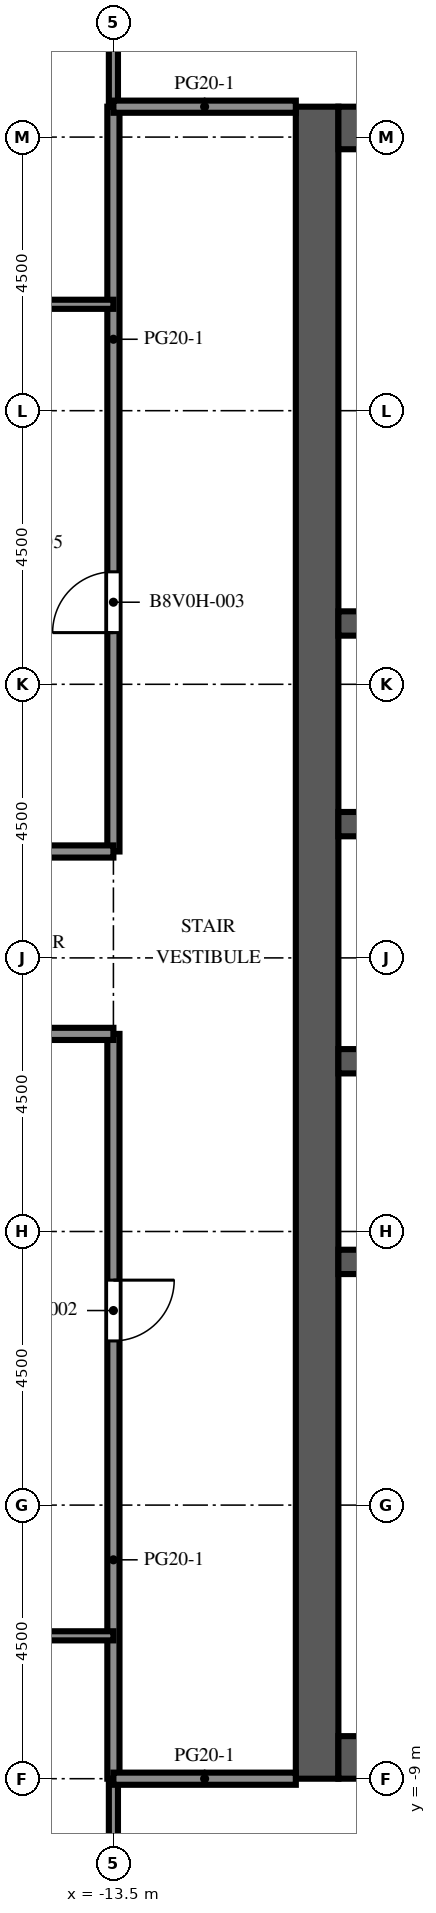
"""IFC4 building model, lengths in metres.
Left out: names, types, materials, properties, quantities, classifications, styles, units other than length and angle.
Written with IfcOpenShell. Run it as: python <this file> out.ifc"""

import sys

from ifc_helpers import new_model, si_unit, direction, frame, frame_2d, origin, place, context, subcontext, project, spatial, rectangle, extrude, element, fill, save


model = new_model("IFC4")
c1 = context("Model", 3, precision=1e-05, world=origin(), true_north=direction((0.0, 1.0)))
c2 = subcontext(c1, "Body", "Model", "MODEL_VIEW")
j1 = project(units=[si_unit("LENGTHUNIT", "METRE"), si_unit("PLANEANGLEUNIT", "RADIAN")], contexts=[c1])
p1 = place(None, origin())
s1 = spatial("IfcSite", under=j1, at=p1, CompositionType="ELEMENT")
p2 = place(p1, origin())
s2 = spatial("IfcBuilding", under=s1, at=p2, CompositionType="ELEMENT")
p3 = place(p2, frame((0.0, 0.0, 266.3)))
s3 = spatial("IfcBuildingStorey", under=s2, at=p3, CompositionType="ELEMENT", Elevation=266.3)
p4 = place(p3, frame((-10.15, -9.0, 0.0), z_axis=(0.0, 0.0, 1.0), x_axis=(0.0, 1.0, 0.0)))
e1 = element("IfcWall", 1, at=p4, inside=s3, PredefinedType="SHEAR", context=c2, shape_type="SweptSolid", body=[
    extrude(rectangle(XDim=27.5, YDim=0.7, at=frame_2d((13.75, 0.0))), origin(), (0.0, 0.0, 1.0), 4.1),
])
p5 = place(p4, frame((12.55, 0.0, 0.0)))
e2 = element("IfcOpeningElement", 2, at=p5, cuts=e1, PredefinedType="OPENING", context=c2, shape_type="SweptSolid", body=[
    extrude(rectangle(XDim=2.4, YDim=2.4, at=frame_2d((1.2, 1.2))), frame((0.0, 0.36, 0.0), z_axis=(0.0, -1.0, 0.0), x_axis=(1.0, 0.0, 0.0)), (0.0, 0.0, 1.0), 0.72),
])
p6 = place(p4, frame((6.825, 0.0, 0.0)))
e3 = element("IfcOpeningElement", 3, at=p6, cuts=e1, PredefinedType="OPENING", context=c2, shape_type="SweptSolid", body=[
    extrude(rectangle(XDim=1.2, YDim=2.1, at=frame_2d((0.6, 1.05))), frame((0.0, 0.36, 0.0), z_axis=(0.0, -1.0, 0.0), x_axis=(1.0, 0.0, 0.0)), (0.0, 0.0, 1.0), 0.72),
])
p7 = place(p4, frame((19.475, 0.0, 0.0)))
e4 = element("IfcOpeningElement", 4, at=p7, cuts=e1, PredefinedType="OPENING", context=c2, shape_type="SweptSolid", body=[
    extrude(rectangle(XDim=1.2, YDim=2.1, at=frame_2d((0.6, 1.05))), frame((0.0, 0.36, 0.0), z_axis=(0.0, -1.0, 0.0), x_axis=(1.0, 0.0, 0.0)), (0.0, 0.0, 1.0), 0.72),
])
for number, where, z_axis, x_axis in (
    (5, (-9.8, -8.65, 0.0), (0.0, 0.0, 1.0), (1.0, 0.0, 0.0)),
    (6, (-9.8, 18.15, 0.0), (0.0, 0.0, 1.0), (1.0, 0.0, 0.0)),
):
    element("IfcWall", number, at=place(p3, frame(where, z_axis=z_axis, x_axis=x_axis)), inside=s3, PredefinedType="SHEAR", context=c2, shape_type="SweptSolid", body=[
        extrude(rectangle(XDim=10.6, YDim=0.7, at=frame_2d((5.3, 0.0))), origin(), (0.0, 0.0, 1.0), 4.1),
    ])
p8 = place(p3, frame((-9.8, -0.5, 0.0), z_axis=(0.0, 0.0, 1.0), x_axis=(1.0, 0.0, 0.0)))
e7 = element("IfcWall", 7, at=p8, inside=s3, PredefinedType="SHEAR", context=c2, shape_type="SweptSolid", body=[
    extrude(rectangle(XDim=10.6, YDim=0.4, at=frame_2d((5.3, 0.0))), origin(), (0.0, 0.0, 1.0), 4.1),
])
p9 = place(p3, frame((-9.8, 2.8, 0.0), z_axis=(0.0, 0.0, 1.0), x_axis=(1.0, 0.0, 0.0)))
e8 = element("IfcWall", 8, at=p9, inside=s3, PredefinedType="SHEAR", context=c2, shape_type="SweptSolid", body=[
    extrude(rectangle(XDim=10.6, YDim=0.4, at=frame_2d((5.3, 0.0))), origin(), (0.0, 0.0, 1.0), 4.1),
])
p10 = place(p9, frame((0.688, 0.0, 0.0)))
e9 = element("IfcOpeningElement", 9, at=p10, cuts=e8, PredefinedType="OPENING", context=c2, shape_type="SweptSolid", body=[
    extrude(rectangle(XDim=1.1, YDim=2.1, at=frame_2d((0.55, 1.05))), frame((0.0, 0.21, 0.0), z_axis=(0.0, -1.0, 0.0), x_axis=(1.0, 0.0, 0.0)), (0.0, 0.0, 1.0), 0.42),
])
p11 = place(p9, frame((3.438, 0.0, 0.0)))
e10 = element("IfcOpeningElement", 10, at=p11, cuts=e8, PredefinedType="OPENING", context=c2, shape_type="SweptSolid", body=[
    extrude(rectangle(XDim=1.1, YDim=2.1, at=frame_2d((0.55, 1.05))), frame((0.0, 0.21, 0.0), z_axis=(0.0, -1.0, 0.0), x_axis=(1.0, 0.0, 0.0)), (0.0, 0.0, 1.0), 0.42),
])
p12 = place(p9, frame((6.113, 0.0, 0.0)))
e11 = element("IfcOpeningElement", 11, at=p12, cuts=e8, PredefinedType="OPENING", context=c2, shape_type="SweptSolid", body=[
    extrude(rectangle(XDim=1.0, YDim=2.1, at=frame_2d((0.5, 1.05))), frame((0.0, 0.21, 0.0), z_axis=(0.0, -1.0, 0.0), x_axis=(1.0, 0.0, 0.0)), (0.0, 0.0, 1.0), 0.42),
])
p13 = place(p9, frame((8.863, 0.0, 0.0)))
e12 = element("IfcOpeningElement", 12, at=p13, cuts=e8, PredefinedType="OPENING", context=c2, shape_type="SweptSolid", body=[
    extrude(rectangle(XDim=1.0, YDim=2.1, at=frame_2d((0.5, 1.05))), frame((0.0, 0.21, 0.0), z_axis=(0.0, -1.0, 0.0), x_axis=(1.0, 0.0, 0.0)), (0.0, 0.0, 1.0), 0.42),
])
p14 = place(p3, frame((-9.8, 6.7, 0.0), z_axis=(0.0, 0.0, 1.0), x_axis=(1.0, 0.0, 0.0)))
e13 = element("IfcWall", 13, at=p14, inside=s3, PredefinedType="SHEAR", context=c2, shape_type="SweptSolid", body=[
    extrude(rectangle(XDim=10.6, YDim=0.4, at=frame_2d((5.3, 0.0))), origin(), (0.0, 0.0, 1.0), 4.1),
])
p15 = place(p14, frame((3.438, 0.0, 0.0)))
e14 = element("IfcOpeningElement", 14, at=p15, cuts=e13, PredefinedType="OPENING", context=c2, shape_type="SweptSolid", body=[
    extrude(rectangle(XDim=1.1, YDim=2.1, at=frame_2d((0.55, 1.05))), frame((0.0, 0.21, 0.0), z_axis=(0.0, -1.0, 0.0), x_axis=(1.0, 0.0, 0.0)), (0.0, 0.0, 1.0), 0.42),
])
p16 = place(p14, frame((6.062, 0.0, 0.0)))
e15 = element("IfcOpeningElement", 15, at=p16, cuts=e13, PredefinedType="OPENING", context=c2, shape_type="SweptSolid", body=[
    extrude(rectangle(XDim=1.1, YDim=2.1, at=frame_2d((0.55, 1.05))), frame((0.0, 0.21, 0.0), z_axis=(0.0, -1.0, 0.0), x_axis=(1.0, 0.0, 0.0)), (0.0, 0.0, 1.0), 0.42),
])
p17 = place(p14, frame((8.812, 0.0, 0.0)))
e16 = element("IfcOpeningElement", 16, at=p17, cuts=e13, PredefinedType="OPENING", context=c2, shape_type="SweptSolid", body=[
    extrude(rectangle(XDim=1.1, YDim=2.1, at=frame_2d((0.55, 1.05))), frame((0.0, 0.21, 0.0), z_axis=(0.0, -1.0, 0.0), x_axis=(1.0, 0.0, 0.0)), (0.0, 0.0, 1.0), 0.42),
])
p18 = place(p14, frame((0.738, 0.0, 0.0)))
e17 = element("IfcOpeningElement", 17, at=p18, cuts=e13, PredefinedType="OPENING", context=c2, shape_type="SweptSolid", body=[
    extrude(rectangle(XDim=1.0, YDim=2.1, at=frame_2d((0.5, 1.05))), frame((0.0, 0.21, 0.0), z_axis=(0.0, -1.0, 0.0), x_axis=(1.0, 0.0, 0.0)), (0.0, 0.0, 1.0), 0.42),
])
p19 = place(p3, frame((-9.8, 10.0, 0.0), z_axis=(0.0, 0.0, 1.0), x_axis=(1.0, 0.0, 0.0)))
e18 = element("IfcWall", 18, at=p19, inside=s3, PredefinedType="SHEAR", context=c2, shape_type="SweptSolid", body=[
    extrude(rectangle(XDim=10.6, YDim=0.4, at=frame_2d((5.3, 0.0))), origin(), (0.0, 0.0, 1.0), 4.1),
])
p20 = place(p3, frame((-13.5, -9.0, 0.0), z_axis=(0.0, 0.0, 1.0), x_axis=(0.0, -1.0, 0.0)))
e19 = element("IfcWall", 19, at=p20, inside=s3, PredefinedType="PARTITIONING", context=c2, shape_type="SweptSolid", body=[
    extrude(rectangle(XDim=8.6, YDim=0.15, at=frame_2d((4.3, 0.0))), origin(), (0.0, 0.0, 1.0), 3.65),
])
p21 = place(p20, frame((5.4, 0.0, 0.0)))
e20 = element("IfcOpeningElement", 20, at=p21, cuts=e19, PredefinedType="OPENING", context=c2, shape_type="SweptSolid", body=[
    extrude(rectangle(XDim=1.0, YDim=2.1, at=frame_2d((0.5, 1.05))), frame((0.0, 0.085, 0.0), z_axis=(0.0, -1.0, 0.0), x_axis=(1.0, 0.0, 0.0)), (0.0, 0.0, 1.0), 0.17),
])
p22 = place(p3, frame((-13.5, 26.6, 0.0), z_axis=(0.0, 0.0, 1.0), x_axis=(0.0, -1.0, 0.0)))
e21 = element("IfcWall", 21, at=p22, inside=s3, PredefinedType="PARTITIONING", context=c2, shape_type="SweptSolid", body=[
    extrude(rectangle(XDim=8.1, YDim=0.15, at=frame_2d((4.05, 0.0))), origin(), (0.0, 0.0, 1.0), 3.65),
])
p23 = place(p22, frame((2.25, 0.0, 0.0)))
e22 = element("IfcOpeningElement", 22, at=p23, cuts=e21, PredefinedType="OPENING", context=c2, shape_type="SweptSolid", body=[
    extrude(rectangle(XDim=1.0, YDim=2.1, at=frame_2d((0.5, 1.05))), frame((0.0, 0.085, 0.0), z_axis=(0.0, -1.0, 0.0), x_axis=(1.0, 0.0, 0.0)), (0.0, 0.0, 1.0), 0.17),
])
p24 = place(p3, frame((-13.5, -9.0, 0.0), z_axis=(0.0, 0.0, 1.0), x_axis=(0.0, 1.0, 0.0)))
e23 = element("IfcWall", 23, at=p24, inside=s3, PredefinedType="PARTITIONING", context=c2, shape_type="SweptSolid", body=[
    extrude(rectangle(XDim=12.25, YDim=0.2, at=frame_2d((6.125, 0.0))), origin(), (0.0, 0.0, 1.0), 3.65),
])
p25 = place(p24, frame((7.2, 0.0, 0.0)))
e24 = element("IfcOpeningElement", 24, at=p25, cuts=e23, PredefinedType="OPENING", context=c2, shape_type="SweptSolid", body=[
    extrude(rectangle(XDim=1.0, YDim=2.1, at=frame_2d((0.5, 1.05))), frame((0.0, 0.11, 0.0), z_axis=(0.0, -1.0, 0.0), x_axis=(1.0, 0.0, 0.0)), (0.0, 0.0, 1.0), 0.22),
])
p26 = place(p3, frame((-13.5, 6.25, 0.0), z_axis=(0.0, 0.0, 1.0), x_axis=(0.0, 1.0, 0.0)))
e25 = element("IfcWall", 25, at=p26, inside=s3, PredefinedType="PARTITIONING", context=c2, shape_type="SweptSolid", body=[
    extrude(rectangle(XDim=12.25, YDim=0.2, at=frame_2d((6.125, 0.0))), origin(), (0.0, 0.0, 1.0), 3.65),
])
p27 = place(p26, frame((3.6, 0.0, 0.0)))
e26 = element("IfcOpeningElement", 26, at=p27, cuts=e25, PredefinedType="OPENING", context=c2, shape_type="SweptSolid", body=[
    extrude(rectangle(XDim=1.0, YDim=2.1, at=frame_2d((0.5, 1.05))), frame((0.0, 0.11, 0.0), z_axis=(0.0, -1.0, 0.0), x_axis=(1.0, 0.0, 0.0)), (0.0, 0.0, 1.0), 0.22),
])
p28 = place(p3, frame((-13.5, -9.0, 0.0), z_axis=(0.0, 0.0, 1.0), x_axis=(1.0, 0.0, 0.0)))
e27 = element("IfcWall", 27, at=p28, inside=s3, PredefinedType="PARTITIONING", context=c2, shape_type="SweptSolid", body=[
    extrude(rectangle(XDim=3.0, YDim=0.2, at=frame_2d((1.5, 0.0))), origin(), (0.0, 0.0, 1.0), 3.65),
])
p29 = place(p3, frame((-13.5, -6.65, 0.0), z_axis=(0.0, 0.0, 1.0), x_axis=(-1.0, 0.0, 0.0)))
e28 = element("IfcWall", 28, at=p29, inside=s3, PredefinedType="PARTITIONING", context=c2, shape_type="SweptSolid", body=[
    extrude(rectangle(XDim=8.85, YDim=0.15, at=frame_2d((4.425, 0.0))), origin(), (0.0, 0.0, 1.0), 3.65),
])
p30 = place(p29, frame((3.4, 0.0, 0.0)))
e29 = element("IfcOpeningElement", 29, at=p30, cuts=e28, PredefinedType="OPENING", context=c2, shape_type="SweptSolid", body=[
    extrude(rectangle(XDim=1.0, YDim=2.1, at=frame_2d((0.5, 1.05))), frame((0.0, 0.085, 0.0), z_axis=(0.0, -1.0, 0.0), x_axis=(1.0, 0.0, 0.0)), (0.0, 0.0, 1.0), 0.17),
])
for number, where, z_axis, x_axis in (
    (30, (-22.35, 3.25, 0.0), (0.0, 0.0, 1.0), (1.0, 0.0, 0.0)),
    (31, (-22.35, 6.25, 0.0), (0.0, 0.0, 1.0), (1.0, 0.0, 0.0)),
):
    element("IfcWall", number, at=place(p3, frame(where, z_axis=z_axis, x_axis=x_axis)), inside=s3, PredefinedType="PARTITIONING", context=c2, shape_type="SweptSolid", body=[
        extrude(rectangle(XDim=8.85, YDim=0.2, at=frame_2d((4.425, 0.0))), origin(), (0.0, 0.0, 1.0), 3.65),
    ])
p31 = place(p3, frame((-22.35, 15.25, 0.0), z_axis=(0.0, 0.0, 1.0), x_axis=(1.0, 0.0, 0.0)))
e32 = element("IfcWall", 32, at=p31, inside=s3, PredefinedType="PARTITIONING", context=c2, shape_type="SweptSolid", body=[
    extrude(rectangle(XDim=8.85, YDim=0.15, at=frame_2d((4.425, 0.0))), origin(), (0.0, 0.0, 1.0), 3.65),
])
p32 = place(p31, frame((3.95, 0.0, 0.0)))
e33 = element("IfcOpeningElement", 33, at=p32, cuts=e32, PredefinedType="OPENING", context=c2, shape_type="SweptSolid", body=[
    extrude(rectangle(XDim=1.0, YDim=2.1, at=frame_2d((0.5, 1.05))), frame((0.0, 0.085, 0.0), z_axis=(0.0, -1.0, 0.0), x_axis=(1.0, 0.0, 0.0)), (0.0, 0.0, 1.0), 0.17),
])
p33 = place(p3, frame((-13.5, 18.5, 0.0), z_axis=(0.0, 0.0, 1.0), x_axis=(1.0, 0.0, 0.0)))
e34 = element("IfcWall", 34, at=p33, inside=s3, PredefinedType="PARTITIONING", context=c2, shape_type="SweptSolid", body=[
    extrude(rectangle(XDim=3.0, YDim=0.2, at=frame_2d((1.5, 0.0))), origin(), (0.0, 0.0, 1.0), 3.65),
])
p34 = place(p5, origin())
e35 = element("IfcDoor", 35, at=p34, inside=s3, OperationType="DOUBLE_DOOR_DOUBLE_SWING", PredefinedType="DOOR", context=c2, shape_type="SweptSolid", body=[
    extrude(rectangle(XDim=2.4, YDim=2.4, at=frame_2d((1.2, 1.2))), frame((0.0, 0.025, 0.0), z_axis=(0.0, -1.0, 0.0), x_axis=(1.0, 0.0, 0.0)), (0.0, 0.0, 1.0), 0.05),
])
fill(e2, e35)
p35 = place(p6, origin())
e36 = element("IfcDoor", 36, at=p35, inside=s3, OperationType="SINGLE_SWING_LEFT", PredefinedType="DOOR", context=c2, shape_type="SweptSolid", body=[
    extrude(rectangle(XDim=1.2, YDim=2.1, at=frame_2d((0.6, 1.05))), frame((0.0, 0.025, 0.0), z_axis=(0.0, -1.0, 0.0), x_axis=(1.0, 0.0, 0.0)), (0.0, 0.0, 1.0), 0.05),
])
fill(e3, e36)
p36 = place(p7, origin())
e37 = element("IfcDoor", 37, at=p36, inside=s3, OperationType="SINGLE_SWING_LEFT", PredefinedType="DOOR", context=c2, shape_type="SweptSolid", body=[
    extrude(rectangle(XDim=1.2, YDim=2.1, at=frame_2d((0.6, 1.05))), frame((0.0, 0.025, 0.0), z_axis=(0.0, -1.0, 0.0), x_axis=(1.0, 0.0, 0.0)), (0.0, 0.0, 1.0), 0.05),
])
fill(e4, e37)
p37 = place(p25, origin())
e38 = element("IfcDoor", 38, at=p37, inside=s3, OperationType="SINGLE_SWING_RIGHT", PredefinedType="DOOR", context=c2, shape_type="SweptSolid", body=[
    extrude(rectangle(XDim=1.0, YDim=2.1, at=frame_2d((0.5, 1.05))), frame((0.0, 0.025, 0.0), z_axis=(0.0, -1.0, 0.0), x_axis=(1.0, 0.0, 0.0)), (0.0, 0.0, 1.0), 0.05),
])
fill(e24, e38)
p38 = place(p27, origin())
e39 = element("IfcDoor", 39, at=p38, inside=s3, OperationType="SINGLE_SWING_LEFT", PredefinedType="DOOR", context=c2, shape_type="SweptSolid", body=[
    extrude(rectangle(XDim=1.0, YDim=2.1, at=frame_2d((0.5, 1.05))), frame((0.0, 0.025, 0.0), z_axis=(0.0, -1.0, 0.0), x_axis=(1.0, 0.0, 0.0)), (0.0, 0.0, 1.0), 0.05),
])
fill(e26, e39)
save(model, sys.argv[1])
